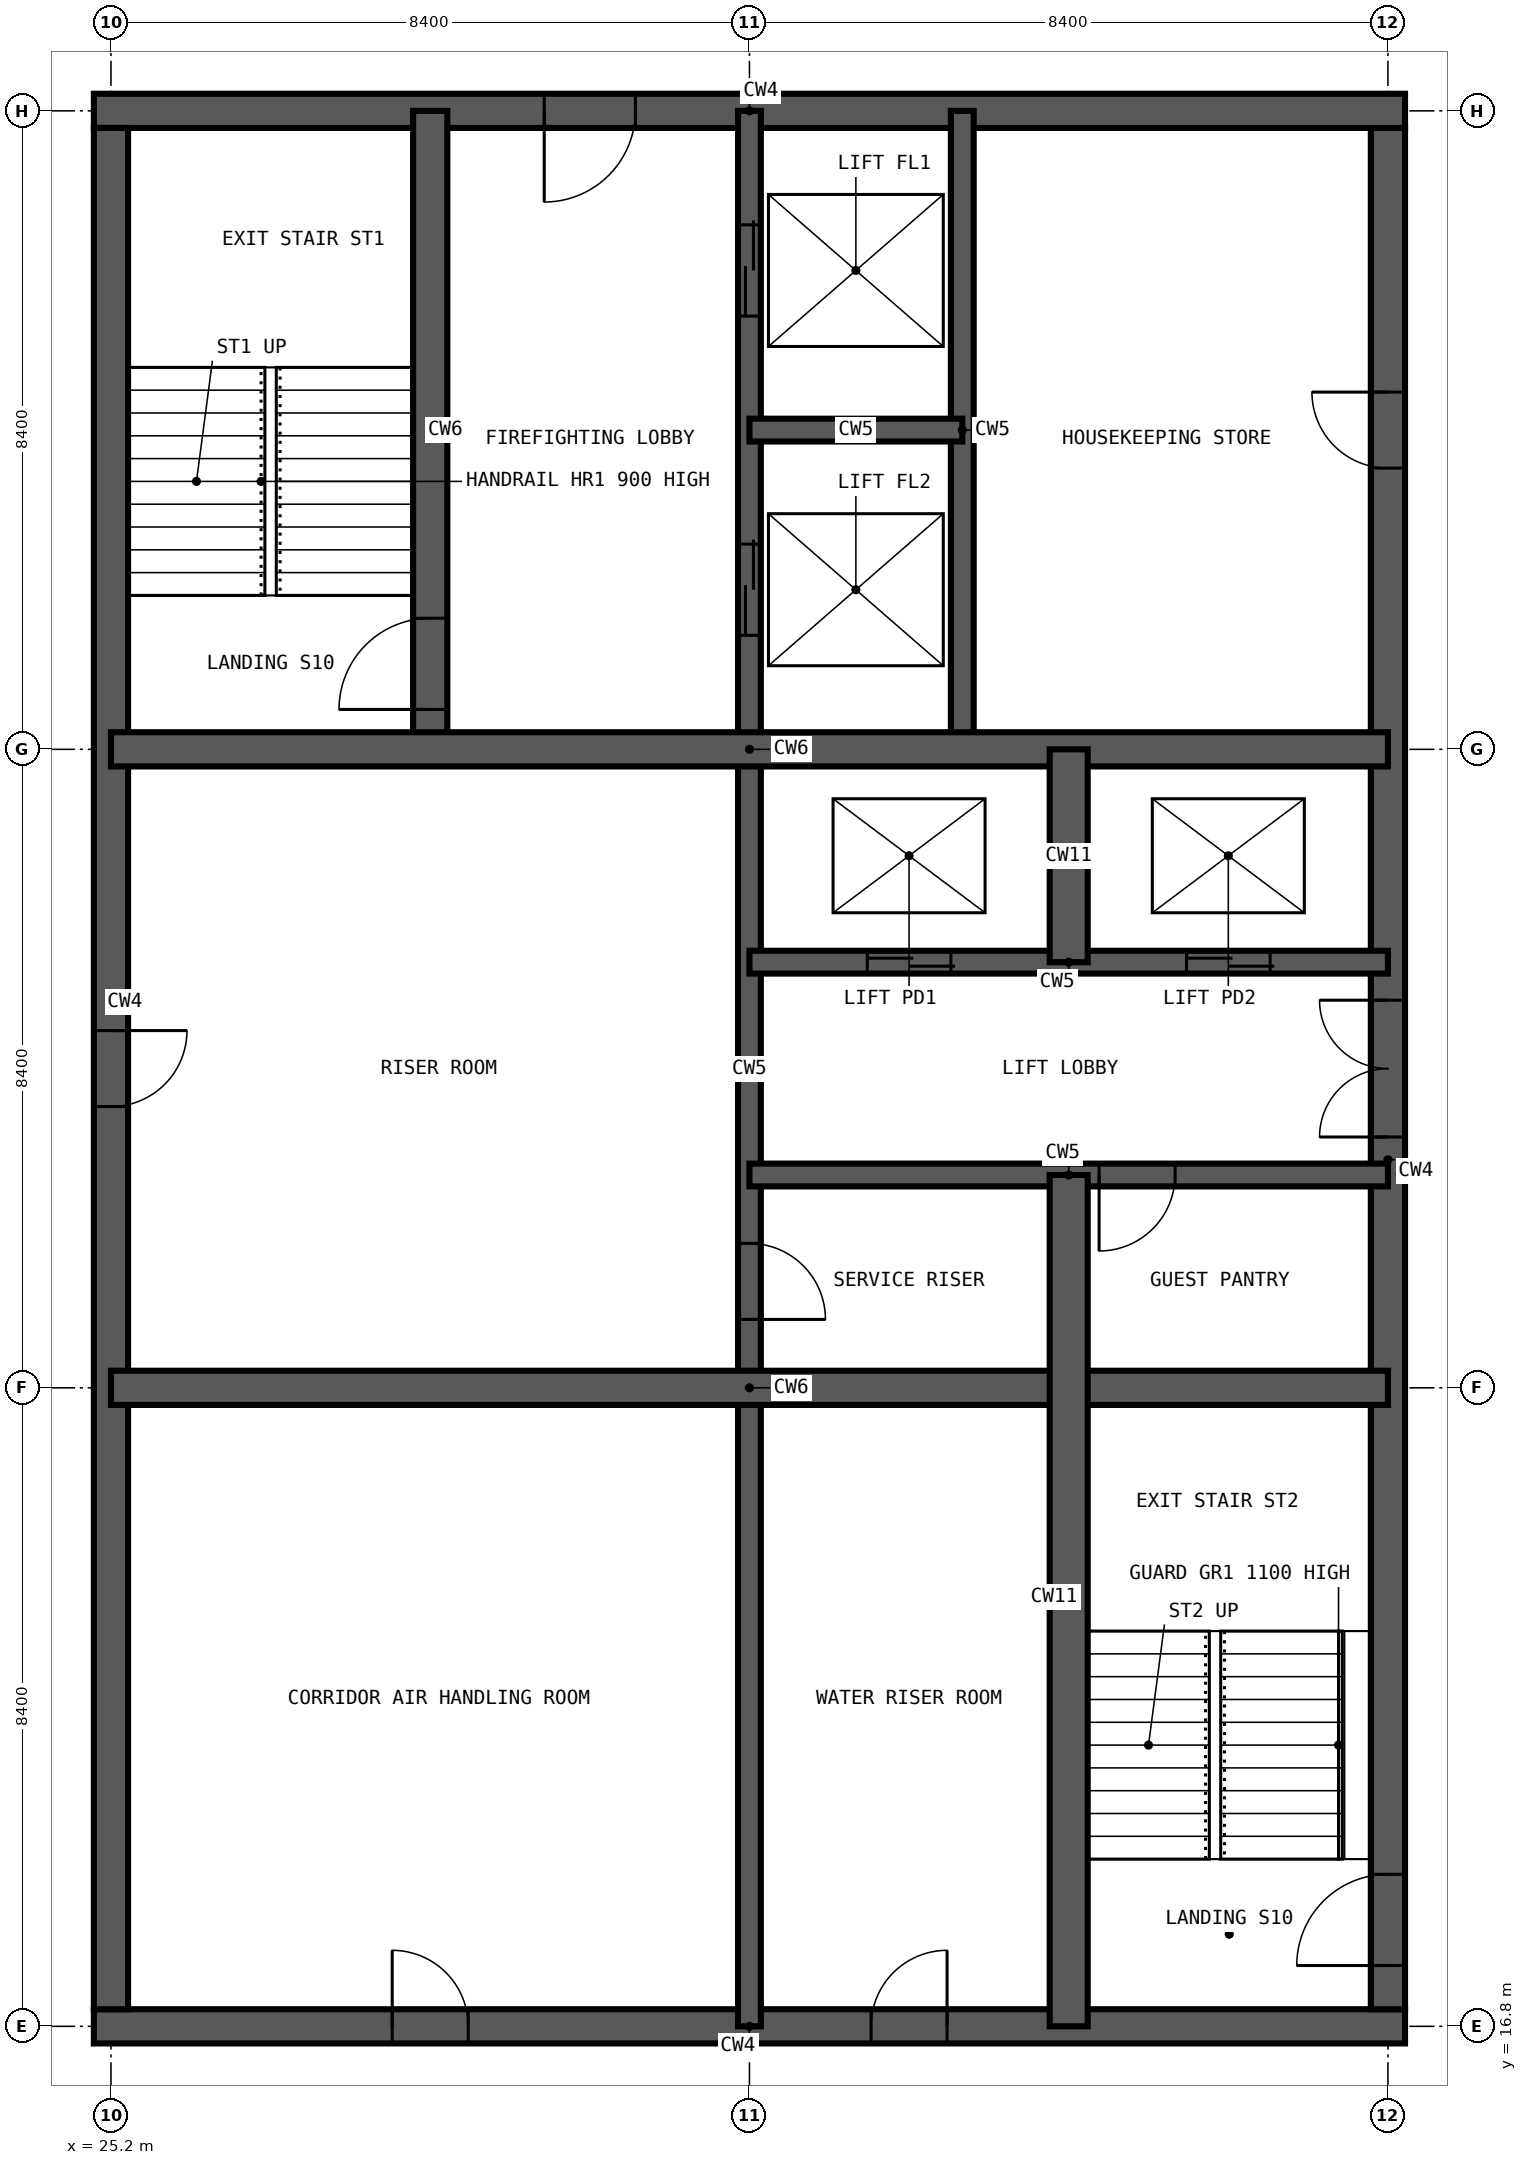
"""IFC4 building model, lengths in metres.
Left out: names, types, materials, properties, quantities, classifications, styles, units other than length and angle.
Written with IfcOpenShell. Run it as: python <this file> out.ifc"""

import sys

from ifc_helpers import new_model, si_unit, direction, frame, frame_2d, origin, place, context, subcontext, project, spatial, rectangle, extrude, element, fill, save


model = new_model("IFC4")
c1 = context("Model", 3, precision=1e-05, world=origin(), true_north=direction((0.0, 1.0)))
c2 = subcontext(c1, "Body", "Model", "MODEL_VIEW")
j1 = project(units=[si_unit("LENGTHUNIT", "METRE"), si_unit("PLANEANGLEUNIT", "RADIAN")], contexts=[c1])
p1 = place(None, origin())
s1 = spatial("IfcSite", under=j1, at=p1, CompositionType="ELEMENT")
p2 = place(p1, origin())
s2 = spatial("IfcBuilding", under=s1, at=p2, CompositionType="ELEMENT")
p3 = place(p2, frame((0.0, 0.0, 264.6)))
s3 = spatial("IfcBuildingStorey", under=s2, at=p3, CompositionType="ELEMENT", Elevation=264.6)
p4 = place(p3, frame((24.975, 16.8, -0.35), z_axis=(0.0, 0.0, 1.0), x_axis=(1.0, 0.0, 0.0)))
e1 = element("IfcWall", 1, at=p4, inside=s3, PredefinedType="SHEAR", context=c2, shape_type="SweptSolid", body=[
    extrude(rectangle(XDim=17.25, YDim=0.45, at=frame_2d((8.625, 0.0))), origin(), (0.0, 0.0, 1.0), 3.9),
])
p5 = place(p4, frame((3.925, 0.0, 0.35)))
e2 = element("IfcOpeningElement", 2, at=p5, cuts=e1, PredefinedType="OPENING", context=c2, shape_type="SweptSolid", body=[
    extrude(rectangle(XDim=1.0, YDim=2.1, at=frame_2d((0.5, 1.05))), frame((0.0, 0.235, 0.0), z_axis=(0.0, -1.0, 0.0), x_axis=(1.0, 0.0, 0.0)), (0.0, 0.0, 1.0), 0.47),
])
p6 = place(p4, frame((10.225, 0.0, 0.35)))
e3 = element("IfcOpeningElement", 3, at=p6, cuts=e1, PredefinedType="OPENING", context=c2, shape_type="SweptSolid", body=[
    extrude(rectangle(XDim=1.0, YDim=2.1, at=frame_2d((0.5, 1.05))), frame((0.0, 0.235, 0.0), z_axis=(0.0, -1.0, 0.0), x_axis=(1.0, 0.0, 0.0)), (0.0, 0.0, 1.0), 0.47),
])
p7 = place(p3, frame((42.0, 17.025, -0.35), z_axis=(0.0, 0.0, 1.0), x_axis=(0.0, 1.0, 0.0)))
e4 = element("IfcWall", 4, at=p7, inside=s3, PredefinedType="SHEAR", context=c2, shape_type="SweptSolid", body=[
    extrude(rectangle(XDim=24.75, YDim=0.45, at=frame_2d((12.375, 0.0))), origin(), (0.0, 0.0, 1.0), 3.9),
])
p8 = place(p7, frame((0.575, 0.0, 0.35)))
e5 = element("IfcOpeningElement", 5, at=p8, cuts=e4, PredefinedType="OPENING", context=c2, shape_type="SweptSolid", body=[
    extrude(rectangle(XDim=1.2, YDim=2.2, at=frame_2d((0.6, 1.1))), frame((0.0, 0.235, 0.0), z_axis=(0.0, -1.0, 0.0), x_axis=(1.0, 0.0, 0.0)), (0.0, 0.0, 1.0), 0.47),
])
p9 = place(p7, frame((11.475, 0.0, 0.35)))
e6 = element("IfcOpeningElement", 6, at=p9, cuts=e4, PredefinedType="OPENING", context=c2, shape_type="SweptSolid", body=[
    extrude(rectangle(XDim=1.8, YDim=2.2, at=frame_2d((0.9, 1.1))), frame((0.0, 0.235, 0.0), z_axis=(0.0, -1.0, 0.0), x_axis=(1.0, 0.0, 0.0)), (0.0, 0.0, 1.0), 0.47),
])
p10 = place(p7, frame((20.275, 0.0, 0.35)))
e7 = element("IfcOpeningElement", 7, at=p10, cuts=e4, PredefinedType="OPENING", context=c2, shape_type="SweptSolid", body=[
    extrude(rectangle(XDim=1.0, YDim=2.1, at=frame_2d((0.5, 1.05))), frame((0.0, 0.235, 0.0), z_axis=(0.0, -1.0, 0.0), x_axis=(1.0, 0.0, 0.0)), (0.0, 0.0, 1.0), 0.47),
])
p11 = place(p3, frame((42.225, 42.0, -0.35), z_axis=(0.0, 0.0, 1.0), x_axis=(-1.0, 0.0, 0.0)))
e8 = element("IfcWall", 8, at=p11, inside=s3, PredefinedType="SHEAR", context=c2, shape_type="SweptSolid", body=[
    extrude(rectangle(XDim=17.25, YDim=0.45, at=frame_2d((8.625, 0.0))), origin(), (0.0, 0.0, 1.0), 3.9),
])
p12 = place(p11, frame((10.125, 0.0, 0.35)))
e9 = element("IfcOpeningElement", 9, at=p12, cuts=e8, PredefinedType="OPENING", context=c2, shape_type="SweptSolid", body=[
    extrude(rectangle(XDim=1.2, YDim=2.2, at=frame_2d((0.6, 1.1))), frame((0.0, 0.235, 0.0), z_axis=(0.0, -1.0, 0.0), x_axis=(1.0, 0.0, 0.0)), (0.0, 0.0, 1.0), 0.47),
])
p13 = place(p3, frame((25.2, 41.775, -0.35), z_axis=(0.0, 0.0, 1.0), x_axis=(0.0, -1.0, 0.0)))
e10 = element("IfcWall", 10, at=p13, inside=s3, PredefinedType="SHEAR", context=c2, shape_type="SweptSolid", body=[
    extrude(rectangle(XDim=24.75, YDim=0.45, at=frame_2d((12.375, 0.0))), origin(), (0.0, 0.0, 1.0), 3.9),
])
p14 = place(p13, frame((11.875, 0.0, 0.35)))
e11 = element("IfcOpeningElement", 11, at=p14, cuts=e10, PredefinedType="OPENING", context=c2, shape_type="SweptSolid", body=[
    extrude(rectangle(XDim=1.0, YDim=2.1, at=frame_2d((0.5, 1.05))), frame((0.0, 0.235, 0.0), z_axis=(0.0, -1.0, 0.0), x_axis=(1.0, 0.0, 0.0)), (0.0, 0.0, 1.0), 0.47),
])
p15 = place(p3, frame((33.6, 16.8, -0.35), z_axis=(0.0, 0.0, 1.0), x_axis=(0.0, 1.0, 0.0)))
e12 = element("IfcWall", 12, at=p15, inside=s3, PredefinedType="SHEAR", context=c2, shape_type="SweptSolid", body=[
    extrude(rectangle(XDim=25.2, YDim=0.3, at=frame_2d((12.6, 0.0))), origin(), (0.0, 0.0, 1.0), 3.9),
])
p16 = place(p15, frame((22.5, 0.0, 0.35)))
e13 = element("IfcOpeningElement", 13, at=p16, cuts=e12, PredefinedType="OPENING", context=c2, shape_type="SweptSolid", body=[
    extrude(rectangle(XDim=1.2, YDim=2.2, at=frame_2d((0.6, 1.1))), frame((0.0, 0.16, 0.0), z_axis=(0.0, -1.0, 0.0), x_axis=(1.0, 0.0, 0.0)), (0.0, 0.0, 1.0), 0.32),
])
p17 = place(p15, frame((18.3, 0.0, 0.35)))
e14 = element("IfcOpeningElement", 14, at=p17, cuts=e12, PredefinedType="OPENING", context=c2, shape_type="SweptSolid", body=[
    extrude(rectangle(XDim=1.2, YDim=2.2, at=frame_2d((0.6, 1.1))), frame((0.0, 0.16, 0.0), z_axis=(0.0, -1.0, 0.0), x_axis=(1.0, 0.0, 0.0)), (0.0, 0.0, 1.0), 0.32),
])
p18 = place(p15, frame((9.3, 0.0, 0.35)))
e15 = element("IfcOpeningElement", 15, at=p18, cuts=e12, PredefinedType="OPENING", context=c2, shape_type="SweptSolid", body=[
    extrude(rectangle(XDim=1.0, YDim=2.1, at=frame_2d((0.5, 1.05))), frame((0.0, 0.16, 0.0), z_axis=(0.0, -1.0, 0.0), x_axis=(1.0, 0.0, 0.0)), (0.0, 0.0, 1.0), 0.32),
])
p19 = place(p3, frame((36.4, 33.6, -0.35), z_axis=(0.0, 0.0, 1.0), x_axis=(0.0, 1.0, 0.0)))
e16 = element("IfcWall", 16, at=p19, inside=s3, PredefinedType="SHEAR", context=c2, shape_type="SweptSolid", body=[
    extrude(rectangle(XDim=8.4, YDim=0.3, at=frame_2d((4.2, 0.0))), origin(), (0.0, 0.0, 1.0), 3.9),
])
p20 = place(p3, frame((33.6, 28.0, -0.35), z_axis=(0.0, 0.0, 1.0), x_axis=(1.0, 0.0, 0.0)))
e17 = element("IfcWall", 17, at=p20, inside=s3, PredefinedType="SHEAR", context=c2, shape_type="SweptSolid", body=[
    extrude(rectangle(XDim=8.4, YDim=0.3, at=frame_2d((4.2, 0.0))), origin(), (0.0, 0.0, 1.0), 3.9),
])
p21 = place(p20, frame((4.6, 0.0, 0.35)))
e18 = element("IfcOpeningElement", 18, at=p21, cuts=e17, PredefinedType="OPENING", context=c2, shape_type="SweptSolid", body=[
    extrude(rectangle(XDim=1.0, YDim=2.1, at=frame_2d((0.5, 1.05))), frame((0.0, 0.16, 0.0), z_axis=(0.0, -1.0, 0.0), x_axis=(1.0, 0.0, 0.0)), (0.0, 0.0, 1.0), 0.32),
])
p22 = place(p3, frame((33.6, 30.8, -0.35), z_axis=(0.0, 0.0, 1.0), x_axis=(1.0, 0.0, 0.0)))
e19 = element("IfcWall", 19, at=p22, inside=s3, PredefinedType="SHEAR", context=c2, shape_type="SweptSolid", body=[
    extrude(rectangle(XDim=8.4, YDim=0.3, at=frame_2d((4.2, 0.0))), origin(), (0.0, 0.0, 1.0), 3.9),
])
p23 = place(p22, frame((1.55, 0.0, 0.35)))
e20 = element("IfcOpeningElement", 20, at=p23, cuts=e19, PredefinedType="OPENING", context=c2, shape_type="SweptSolid", body=[
    extrude(rectangle(XDim=1.1, YDim=2.2, at=frame_2d((0.55, 1.1))), frame((0.0, 0.16, 0.0), z_axis=(0.0, -1.0, 0.0), x_axis=(1.0, 0.0, 0.0)), (0.0, 0.0, 1.0), 0.32),
])
p24 = place(p22, frame((5.75, 0.0, 0.35)))
e21 = element("IfcOpeningElement", 21, at=p24, cuts=e19, PredefinedType="OPENING", context=c2, shape_type="SweptSolid", body=[
    extrude(rectangle(XDim=1.1, YDim=2.2, at=frame_2d((0.55, 1.1))), frame((0.0, 0.16, 0.0), z_axis=(0.0, -1.0, 0.0), x_axis=(1.0, 0.0, 0.0)), (0.0, 0.0, 1.0), 0.32),
])
p25 = place(p3, frame((33.6, 37.8, -0.35), z_axis=(0.0, 0.0, 1.0), x_axis=(1.0, 0.0, 0.0)))
e22 = element("IfcWall", 22, at=p25, inside=s3, PredefinedType="SHEAR", context=c2, shape_type="SweptSolid", body=[
    extrude(rectangle(XDim=2.8, YDim=0.3, at=frame_2d((1.4, 0.0))), origin(), (0.0, 0.0, 1.0), 3.9),
])
p26 = place(p3, frame((29.4, 33.6, -0.35), z_axis=(0.0, 0.0, 1.0), x_axis=(0.0, 1.0, 0.0)))
e23 = element("IfcWall", 23, at=p26, inside=s3, PredefinedType="SHEAR", context=c2, shape_type="SweptSolid", body=[
    extrude(rectangle(XDim=8.4, YDim=0.45, at=frame_2d((4.2, 0.0))), origin(), (0.0, 0.0, 1.0), 3.9),
])
p27 = place(p26, frame((0.525, 0.0, 0.35)))
e24 = element("IfcOpeningElement", 24, at=p27, cuts=e23, PredefinedType="OPENING", context=c2, shape_type="SweptSolid", body=[
    extrude(rectangle(XDim=1.2, YDim=2.2, at=frame_2d((0.6, 1.1))), frame((0.0, 0.235, 0.0), z_axis=(0.0, -1.0, 0.0), x_axis=(1.0, 0.0, 0.0)), (0.0, 0.0, 1.0), 0.47),
])
for number, where, z_axis, x_axis in (
    (25, (25.2, 25.2, -0.35), (0.0, 0.0, 1.0), (1.0, 0.0, 0.0)),
    (26, (25.2, 33.6, -0.35), (0.0, 0.0, 1.0), (1.0, 0.0, 0.0)),
):
    element("IfcWall", number, at=place(p3, frame(where, z_axis=z_axis, x_axis=x_axis)), inside=s3, PredefinedType="SHEAR", context=c2, shape_type="SweptSolid", body=[
        extrude(rectangle(XDim=16.8, YDim=0.45, at=frame_2d((8.4, 0.0))), origin(), (0.0, 0.0, 1.0), 3.9),
    ])
p28 = place(p3, frame((37.8, 16.8, -0.35), z_axis=(0.0, 0.0, 1.0), x_axis=(0.0, 1.0, 0.0)))
e27 = element("IfcWall", 27, at=p28, inside=s3, PredefinedType="SHEAR", context=c2, shape_type="SweptSolid", body=[
    extrude(rectangle(XDim=11.2, YDim=0.5, at=frame_2d((5.6, 0.0))), origin(), (0.0, 0.0, 1.0), 3.9),
])
p29 = place(p3, frame((37.8, 30.8, -0.35), z_axis=(0.0, 0.0, 1.0), x_axis=(0.0, 1.0, 0.0)))
e28 = element("IfcWall", 28, at=p29, inside=s3, PredefinedType="SHEAR", context=c2, shape_type="SweptSolid", body=[
    extrude(rectangle(XDim=2.8, YDim=0.5, at=frame_2d((1.4, 0.0))), origin(), (0.0, 0.0, 1.0), 3.9),
])
p30 = place(p27, origin())
e29 = element("IfcDoor", 29, at=p30, inside=s3, OperationType="SINGLE_SWING_LEFT", PredefinedType="DOOR", context=c2, shape_type="SweptSolid", body=[
    extrude(rectangle(XDim=1.2, YDim=2.2, at=frame_2d((0.6, 1.1))), frame((0.0, 0.025, 0.0), z_axis=(0.0, -1.0, 0.0), x_axis=(1.0, 0.0, 0.0)), (0.0, 0.0, 1.0), 0.05),
])
fill(e24, e29)
p31 = place(p8, origin())
e30 = element("IfcDoor", 30, at=p31, inside=s3, OperationType="SINGLE_SWING_LEFT", PredefinedType="DOOR", context=c2, shape_type="SweptSolid", body=[
    extrude(rectangle(XDim=1.2, YDim=2.2, at=frame_2d((0.6, 1.1))), frame((0.0, 0.025, 0.0), z_axis=(0.0, -1.0, 0.0), x_axis=(1.0, 0.0, 0.0)), (0.0, 0.0, 1.0), 0.05),
])
fill(e5, e30)
p32 = place(p23, origin())
e31 = element("IfcDoor", 31, at=p32, inside=s3, OperationType="DOUBLE_DOOR_SLIDING", PredefinedType="DOOR", context=c2, shape_type="SweptSolid", body=[
    extrude(rectangle(XDim=1.1, YDim=2.2, at=frame_2d((0.55, 1.1))), frame((0.0, 0.025, 0.0), z_axis=(0.0, -1.0, 0.0), x_axis=(1.0, 0.0, 0.0)), (0.0, 0.0, 1.0), 0.05),
])
fill(e20, e31)
p33 = place(p24, origin())
e32 = element("IfcDoor", 32, at=p33, inside=s3, OperationType="DOUBLE_DOOR_SLIDING", PredefinedType="DOOR", context=c2, shape_type="SweptSolid", body=[
    extrude(rectangle(XDim=1.1, YDim=2.2, at=frame_2d((0.55, 1.1))), frame((0.0, 0.025, 0.0), z_axis=(0.0, -1.0, 0.0), x_axis=(1.0, 0.0, 0.0)), (0.0, 0.0, 1.0), 0.05),
])
fill(e21, e32)
p34 = place(p16, origin())
e33 = element("IfcDoor", 33, at=p34, inside=s3, OperationType="DOUBLE_DOOR_SLIDING", PredefinedType="DOOR", context=c2, shape_type="SweptSolid", body=[
    extrude(rectangle(XDim=1.2, YDim=2.2, at=frame_2d((0.6, 1.1))), frame((0.0, 0.025, 0.0), z_axis=(0.0, -1.0, 0.0), x_axis=(1.0, 0.0, 0.0)), (0.0, 0.0, 1.0), 0.05),
])
fill(e13, e33)
p35 = place(p17, origin())
e34 = element("IfcDoor", 34, at=p35, inside=s3, OperationType="DOUBLE_DOOR_SLIDING", PredefinedType="DOOR", context=c2, shape_type="SweptSolid", body=[
    extrude(rectangle(XDim=1.2, YDim=2.2, at=frame_2d((0.6, 1.1))), frame((0.0, 0.025, 0.0), z_axis=(0.0, -1.0, 0.0), x_axis=(1.0, 0.0, 0.0)), (0.0, 0.0, 1.0), 0.05),
])
fill(e14, e34)
p36 = place(p14, origin())
e35 = element("IfcDoor", 35, at=p36, inside=s3, OperationType="SINGLE_SWING_LEFT", PredefinedType="DOOR", context=c2, shape_type="SweptSolid", body=[
    extrude(rectangle(XDim=1.0, YDim=2.1, at=frame_2d((0.5, 1.05))), frame((0.0, 0.025, 0.0), z_axis=(0.0, -1.0, 0.0), x_axis=(1.0, 0.0, 0.0)), (0.0, 0.0, 1.0), 0.05),
])
fill(e11, e35)
p37 = place(p18, frame((1.0, 0.0, 0.0), z_axis=(0.0, 0.0, 1.0), x_axis=(-1.0, 0.0, 0.0)))
e36 = element("IfcDoor", 36, at=p37, inside=s3, OperationType="SINGLE_SWING_RIGHT", PredefinedType="DOOR", context=c2, shape_type="SweptSolid", body=[
    extrude(rectangle(XDim=1.0, YDim=2.1, at=frame_2d((0.5, 1.05))), frame((0.0, 0.025, 0.0), z_axis=(0.0, -1.0, 0.0), x_axis=(1.0, 0.0, 0.0)), (0.0, 0.0, 1.0), 0.05),
])
fill(e15, e36)
p38 = place(p21, frame((1.0, 0.0, 0.0), z_axis=(0.0, 0.0, 1.0), x_axis=(-1.0, 0.0, 0.0)))
e37 = element("IfcDoor", 37, at=p38, inside=s3, OperationType="SINGLE_SWING_RIGHT", PredefinedType="DOOR", context=c2, shape_type="SweptSolid", body=[
    extrude(rectangle(XDim=1.0, YDim=2.1, at=frame_2d((0.5, 1.05))), frame((0.0, 0.025, 0.0), z_axis=(0.0, -1.0, 0.0), x_axis=(1.0, 0.0, 0.0)), (0.0, 0.0, 1.0), 0.05),
])
fill(e18, e37)
p39 = place(p9, origin())
e38 = element("IfcDoor", 38, at=p39, inside=s3, OperationType="DOUBLE_DOOR_DOUBLE_SWING", PredefinedType="DOOR", context=c2, shape_type="SweptSolid", body=[
    extrude(rectangle(XDim=1.8, YDim=2.2, at=frame_2d((0.9, 1.1))), frame((0.0, 0.025, 0.0), z_axis=(0.0, -1.0, 0.0), x_axis=(1.0, 0.0, 0.0)), (0.0, 0.0, 1.0), 0.05),
])
fill(e6, e38)
p40 = place(p12, origin())
e39 = element("IfcDoor", 39, at=p40, inside=s3, OperationType="SINGLE_SWING_RIGHT", PredefinedType="DOOR", context=c2, shape_type="SweptSolid", body=[
    extrude(rectangle(XDim=1.2, YDim=2.2, at=frame_2d((0.6, 1.1))), frame((0.0, 0.025, 0.0), z_axis=(0.0, -1.0, 0.0), x_axis=(1.0, 0.0, 0.0)), (0.0, 0.0, 1.0), 0.05),
])
fill(e9, e39)
p41 = place(p10, origin())
e40 = element("IfcDoor", 40, at=p41, inside=s3, OperationType="SINGLE_SWING_RIGHT", PredefinedType="DOOR", context=c2, shape_type="SweptSolid", body=[
    extrude(rectangle(XDim=1.0, YDim=2.1, at=frame_2d((0.5, 1.05))), frame((0.0, 0.025, 0.0), z_axis=(0.0, -1.0, 0.0), x_axis=(1.0, 0.0, 0.0)), (0.0, 0.0, 1.0), 0.05),
])
fill(e7, e40)
p42 = place(p5, origin())
e41 = element("IfcDoor", 41, at=p42, inside=s3, OperationType="SINGLE_SWING_LEFT", PredefinedType="DOOR", context=c2, shape_type="SweptSolid", body=[
    extrude(rectangle(XDim=1.0, YDim=2.1, at=frame_2d((0.5, 1.05))), frame((0.0, 0.025, 0.0), z_axis=(0.0, -1.0, 0.0), x_axis=(1.0, 0.0, 0.0)), (0.0, 0.0, 1.0), 0.05),
])
fill(e2, e41)
p43 = place(p6, origin())
e42 = element("IfcDoor", 42, at=p43, inside=s3, OperationType="SINGLE_SWING_RIGHT", PredefinedType="DOOR", context=c2, shape_type="SweptSolid", body=[
    extrude(rectangle(XDim=1.0, YDim=2.1, at=frame_2d((0.5, 1.05))), frame((0.0, 0.025, 0.0), z_axis=(0.0, -1.0, 0.0), x_axis=(1.0, 0.0, 0.0)), (0.0, 0.0, 1.0), 0.05),
])
fill(e3, e42)
save(model, sys.argv[1])
